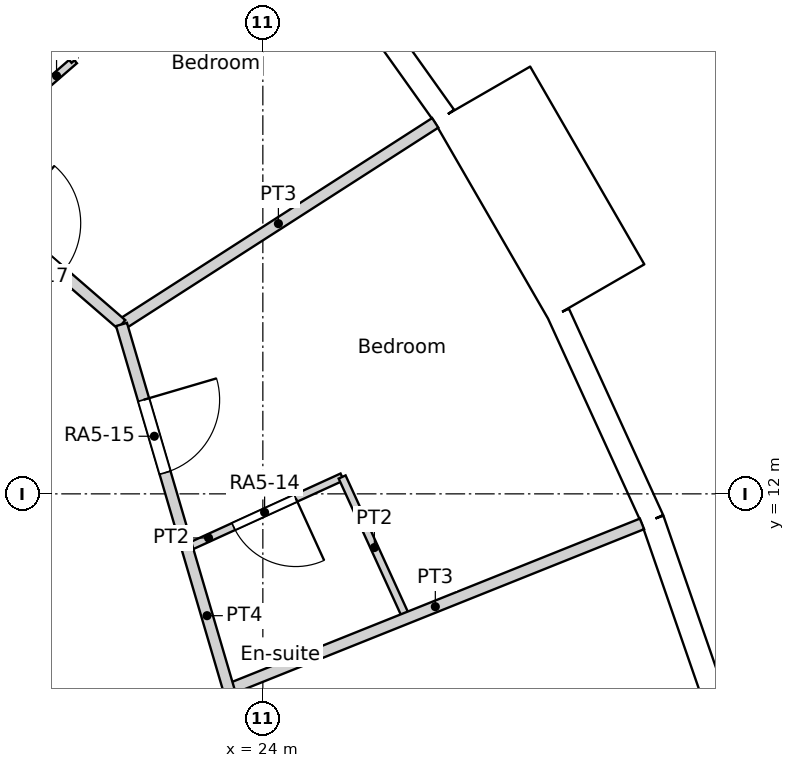
"""IFC4 building model, lengths in metres.
Left out: names, types, materials, properties, quantities, classifications, styles, units other than length and angle.
Written with IfcOpenShell. Run it as: python <this file> out.ifc"""

import sys

from ifc_helpers import new_model, si_unit, direction, frame, frame_2d, origin, origin_2d, place, context, subcontext, project, spatial, rectangle, circle, extrude, element, fill, save


model = new_model("IFC4")
c1 = context("Model", 3, precision=1e-05, world=origin(), true_north=direction((0.0, 1.0)))
c2 = subcontext(c1, "Body", "Model", "MODEL_VIEW")
j1 = project(units=[si_unit("LENGTHUNIT", "METRE"), si_unit("PLANEANGLEUNIT", "RADIAN")], contexts=[c1])
p1 = place(None, origin())
s1 = spatial("IfcSite", under=j1, at=p1, CompositionType="ELEMENT")
p2 = place(p1, origin())
s2 = spatial("IfcBuilding", under=s1, at=p2, CompositionType="ELEMENT")
p3 = place(p2, frame((0.0, 0.0, 71.4)))
s3 = spatial("IfcBuildingStorey", under=s2, at=p3, CompositionType="ELEMENT", Elevation=71.4)
for number, where, z_axis, x_axis in (
    (1, (28.106, 11.252, 0.0), (0.0, 0.0, 1.0), (1.0, 0.0, 0.0)),
    (2, (25.469, 16.368, 0.0), (0.0, 0.0, 1.0), (1.0, 0.0, 0.0)),
):
    element("IfcColumn", number, at=place(p3, frame(where, z_axis=z_axis, x_axis=x_axis)), inside=s3, PredefinedType="COLUMN", context=c2, shape_type="SweptSolid", body=[
        extrude(circle(Radius=0.6, at=origin_2d()), origin(), (0.0, 0.0, 1.0), 3.6),
    ])
p4 = place(p3, frame((21.937, 11.017, 0.0), z_axis=(0.0, 0.0, 1.0), x_axis=(1.0, 0.0, 0.0)))
e3 = element("IfcColumn", 3, at=p4, inside=s3, PredefinedType="COLUMN", context=c2, shape_type="SweptSolid", body=[
    extrude(circle(Radius=0.65, at=origin_2d()), origin(), (0.0, 0.0, 1.0), 3.6),
])
p5 = place(p3, frame((30.102, 8.845, 0.0), z_axis=(0.0, 0.0, 1.0), x_axis=(-0.327096492592, 0.944990944154, 0.0)))
e4 = element("IfcWall", 4, at=p5, inside=s3, PredefinedType="SOLIDWALL", context=c2, shape_type="SweptSolid", body=[
    extrude(rectangle(XDim=2.979, YDim=0.3, at=frame_2d((1.49, 0.0))), origin(), (0.0, 0.0, 1.0), 3.15),
])
p6 = place(p5, frame((1.49, 0.0, 1.55)))
e5 = element("IfcOpeningElement", 5, at=p6, cuts=e4, PredefinedType="OPENING", context=c2, shape_type="SweptSolid", body=[
    extrude(circle(Radius=0.9, at=origin_2d()), frame((0.0, 0.16, 0.0), z_axis=(0.0, -1.0, 0.0), x_axis=(1.0, 0.0, 0.0)), (0.0, 0.0, 1.0), 0.32),
])
p7 = place(p3, frame((29.127, 11.661, 0.0), z_axis=(0.0, 0.0, 1.0), x_axis=(-0.415407317162, 0.909635509888, 0.0)))
e6 = element("IfcWall", 6, at=p7, inside=s3, PredefinedType="SOLIDWALL", context=c2, shape_type="SweptSolid", body=[
    extrude(rectangle(XDim=2.98, YDim=0.3, at=frame_2d((1.49, 0.0))), origin(), (0.0, 0.0, 1.0), 3.15),
])
p8 = place(p7, frame((1.49, 0.0, 1.55)))
e7 = element("IfcOpeningElement", 7, at=p8, cuts=e6, PredefinedType="OPENING", context=c2, shape_type="SweptSolid", body=[
    extrude(circle(Radius=0.9, at=origin_2d()), frame((0.0, 0.16, 0.0), z_axis=(0.0, -1.0, 0.0), x_axis=(1.0, 0.0, 0.0)), (0.0, 0.0, 1.0), 0.32),
])
p9 = place(p3, frame((28.388, 14.658, -0.45), z_axis=(0.0, 0.0, 1.0), x_axis=(-0.499990139034, 0.866031096941, 0.0)))
e8 = element("IfcWall", 8, at=p9, inside=s3, PredefinedType="ELEMENTEDWALL", context=c2, shape_type="SweptSolid", body=[
    extrude(rectangle(XDim=3.0, YDim=1.45, at=frame_2d((1.5, 0.0))), origin(), (0.0, 0.0, 1.0), 3.6),
])
p10 = place(p9, frame((1.5, 0.0, 2.0)))
e9 = element("IfcOpeningElement", 9, at=p10, cuts=e8, PredefinedType="OPENING", context=c2, shape_type="SweptSolid", body=[
    extrude(circle(Radius=0.9, at=origin_2d()), frame((0.0, 0.735, 0.0), z_axis=(0.0, -1.0, 0.0), x_axis=(1.0, 0.0, 0.0)), (0.0, 0.0, 1.0), 1.47),
])
p11 = place(p3, frame((26.39, 16.967, 0.0), z_axis=(0.0, 0.0, 1.0), x_axis=(-0.580113774115, 0.814535456, 0.0)))
e10 = element("IfcWall", 10, at=p11, inside=s3, PredefinedType="SOLIDWALL", context=c2, shape_type="SweptSolid", body=[
    extrude(rectangle(XDim=2.98, YDim=0.3, at=frame_2d((1.49, 0.0))), origin(), (0.0, 0.0, 1.0), 3.15),
])
p12 = place(p11, frame((1.49, 0.0, 1.55)))
e11 = element("IfcOpeningElement", 11, at=p12, cuts=e10, PredefinedType="OPENING", context=c2, shape_type="SweptSolid", body=[
    extrude(circle(Radius=0.9, at=origin_2d()), frame((0.0, 0.16, 0.0), z_axis=(0.0, -1.0, 0.0), x_axis=(1.0, 0.0, 0.0)), (0.0, 0.0, 1.0), 0.32),
])
p13 = place(p3, frame((22.14, 14.229, 0.0), z_axis=(0.0, 0.0, 1.0), x_axis=(0.281780364869, -0.959478934617, 0.0)))
e12 = element("IfcWall", 12, at=p13, inside=s3, PredefinedType="PARTITIONING", context=c2, shape_type="SweptSolid", body=[
    extrude(rectangle(XDim=14.83, YDim=0.15, at=frame_2d((7.415, 0.0))), origin(), (0.0, 0.0, 1.0), 3.15),
])
p14 = place(p13, frame((10.816, 0.0, 0.0)))
e13 = element("IfcOpeningElement", 13, at=p14, cuts=e12, PredefinedType="OPENING", context=c2, shape_type="SweptSolid", body=[
    extrude(rectangle(XDim=1.0, YDim=2.1, at=frame_2d((0.5, 1.05))), frame((0.0, 0.075, 0.0), z_axis=(0.0, -1.0, 0.0), x_axis=(1.0, 0.0, 0.0)), (0.0, 0.0, 1.0), 0.15),
])
p15 = place(p13, frame((5.953, 0.0, 0.0)))
e14 = element("IfcOpeningElement", 14, at=p15, cuts=e12, PredefinedType="OPENING", context=c2, shape_type="SweptSolid", body=[
    extrude(rectangle(XDim=1.0, YDim=2.1, at=frame_2d((0.5, 1.05))), frame((0.0, 0.075, 0.0), z_axis=(0.0, -1.0, 0.0), x_axis=(1.0, 0.0, 0.0)), (0.0, 0.0, 1.0), 0.15),
])
p16 = place(p13, frame((1.033, 0.0, 0.0)))
e15 = element("IfcOpeningElement", 15, at=p16, cuts=e12, PredefinedType="OPENING", context=c2, shape_type="SweptSolid", body=[
    extrude(rectangle(XDim=1.0, YDim=2.1, at=frame_2d((0.5, 1.05))), frame((0.0, 0.075, 0.0), z_axis=(0.0, -1.0, 0.0), x_axis=(1.0, 0.0, 0.0)), (0.0, 0.0, 1.0), 0.15),
])
p17 = place(p3, frame((10.932, 23.939, 0.0), z_axis=(0.0, 0.0, 1.0), x_axis=(0.755838982892, -0.654757536757, 0.0)))
e16 = element("IfcWall", 16, at=p17, inside=s3, PredefinedType="PARTITIONING", context=c2, shape_type="SweptSolid", body=[
    extrude(rectangle(XDim=14.83, YDim=0.15, at=frame_2d((7.415, 0.0))), origin(), (0.0, 0.0, 1.0), 3.15),
])
p18 = place(p17, frame((12.796, 0.0, 0.0)))
e17 = element("IfcOpeningElement", 17, at=p18, cuts=e16, PredefinedType="OPENING", context=c2, shape_type="SweptSolid", body=[
    extrude(rectangle(XDim=1.0, YDim=2.1, at=frame_2d((0.5, 1.05))), frame((0.0, 0.075, 0.0), z_axis=(0.0, -1.0, 0.0), x_axis=(1.0, 0.0, 0.0)), (0.0, 0.0, 1.0), 0.15),
])
p19 = place(p17, frame((7.572, 0.0, 0.0)))
e18 = element("IfcOpeningElement", 18, at=p19, cuts=e16, PredefinedType="OPENING", context=c2, shape_type="SweptSolid", body=[
    extrude(rectangle(XDim=1.0, YDim=2.1, at=frame_2d((0.5, 1.05))), frame((0.0, 0.075, 0.0), z_axis=(0.0, -1.0, 0.0), x_axis=(1.0, 0.0, 0.0)), (0.0, 0.0, 1.0), 0.15),
])
p20 = place(p17, frame((1.033, 0.0, 0.0)))
e19 = element("IfcOpeningElement", 19, at=p20, cuts=e16, PredefinedType="OPENING", context=c2, shape_type="SweptSolid", body=[
    extrude(rectangle(XDim=1.0, YDim=2.1, at=frame_2d((0.5, 1.05))), frame((0.0, 0.075, 0.0), z_axis=(0.0, -1.0, 0.0), x_axis=(1.0, 0.0, 0.0)), (0.0, 0.0, 1.0), 0.15),
])
p21 = place(p3, frame((23.55, 9.427, 0.0), z_axis=(0.0, 0.0, 1.0), x_axis=(0.928307005382, 0.371814609393, 0.0)))
e20 = element("IfcWall", 20, at=p21, inside=s3, PredefinedType="PARTITIONING", context=c2, shape_type="SweptSolid", body=[
    extrude(rectangle(XDim=5.858, YDim=0.15, at=frame_2d((2.929, 0.0))), origin(), (0.0, 0.0, 1.0), 3.15),
])
p22 = place(p3, frame((25.043, 12.222, 0.0), z_axis=(0.0, 0.0, 1.0), x_axis=(0.41546015385, -0.909611378866, 0.0)))
e21 = element("IfcWall", 21, at=p22, inside=s3, PredefinedType="PARTITIONING", context=c2, shape_type="SweptSolid", body=[
    extrude(rectangle(XDim=2.042, YDim=0.1, at=frame_2d((1.021, 0.0))), origin(), (0.0, 0.0, 1.0), 3.15),
])
p23 = place(p3, frame((23.003, 11.291, 0.0), z_axis=(0.0, 0.0, 1.0), x_axis=(0.90975773562, 0.41513956988, 0.0)))
e22 = element("IfcWall", 22, at=p23, inside=s3, PredefinedType="PARTITIONING", context=c2, shape_type="SweptSolid", body=[
    extrude(rectangle(XDim=2.242, YDim=0.1, at=frame_2d((1.121, 0.0))), origin(), (0.0, 0.0, 1.0), 3.15),
])
p24 = place(p23, frame((0.671, 0.0, 0.0)))
e23 = element("IfcOpeningElement", 23, at=p24, cuts=e22, PredefinedType="OPENING", context=c2, shape_type="SweptSolid", body=[
    extrude(rectangle(XDim=0.9, YDim=2.04, at=frame_2d((0.45, 1.02))), frame((0.0, 0.05, 0.0), z_axis=(0.0, -1.0, 0.0), x_axis=(1.0, 0.0, 0.0)), (0.0, 0.0, 1.0), 0.1),
])
p25 = place(p3, frame((22.141, 14.229, 0.0), z_axis=(0.0, 0.0, 1.0), x_axis=(0.841265781699, 0.540621757371, 0.0)))
e24 = element("IfcWall", 24, at=p25, inside=s3, PredefinedType="PARTITIONING", context=c2, shape_type="SweptSolid", body=[
    extrude(rectangle(XDim=4.906, YDim=0.15, at=frame_2d((2.453, 0.0))), origin(), (0.0, 0.0, 1.0), 3.15),
])
p26 = place(p3, frame((19.826, 16.234, 0.0), z_axis=(0.0, 0.0, 1.0), x_axis=(0.755703447798, 0.654913963042, 0.0)))
e25 = element("IfcWall", 25, at=p26, inside=s3, PredefinedType="PARTITIONING", context=c2, shape_type="SweptSolid", body=[
    extrude(rectangle(XDim=2.243, YDim=0.1, at=frame_2d((1.122, 0.0))), origin(), (0.0, 0.0, 1.0), 3.15),
])
p27 = place(p26, frame((0.671, 0.0, 0.0)))
e26 = element("IfcOpeningElement", 26, at=p27, cuts=e25, PredefinedType="OPENING", context=c2, shape_type="SweptSolid", body=[
    extrude(rectangle(XDim=0.9, YDim=2.04, at=frame_2d((0.45, 1.02))), frame((0.0, 0.05, 0.0), z_axis=(0.0, -1.0, 0.0), x_axis=(1.0, 0.0, 0.0)), (0.0, 0.0, 1.0), 0.1),
])
p28 = place(p3, frame((20.184, 19.245, 0.0), z_axis=(0.0, 0.0, 1.0), x_axis=(0.655017058368, -0.755614090159, 0.0)))
e27 = element("IfcWall", 27, at=p28, inside=s3, PredefinedType="PARTITIONING", context=c2, shape_type="SweptSolid", body=[
    extrude(rectangle(XDim=2.041, YDim=0.1, at=frame_2d((1.021, 0.0))), origin(), (0.0, 0.0, 1.0), 3.15),
])
p29 = place(p3, frame((18.36, 17.505, 0.0), z_axis=(0.0, 0.0, 1.0), x_axis=(0.723686703731, 0.690128650937, 0.0)))
e28 = element("IfcWall", 28, at=p29, inside=s3, PredefinedType="PARTITIONING", context=c2, shape_type="SweptSolid", body=[
    extrude(rectangle(XDim=5.856, YDim=0.15, at=frame_2d((2.928, 0.0))), origin(), (0.0, 0.0, 1.0), 3.15),
])
p30 = place(p6, origin())
e29 = element("IfcWindow", 29, at=p30, inside=s3, PartitioningType="SINGLE_PANEL", PredefinedType="WINDOW", context=c2, shape_type="SweptSolid", body=[
    extrude(circle(Radius=0.9, at=origin_2d()), frame((0.0, 0.12, 0.0), z_axis=(0.0, -1.0, 0.0), x_axis=(1.0, 0.0, 0.0)), (0.0, 0.0, 1.0), 0.1),
])
fill(e5, e29)
p31 = place(p8, origin())
e30 = element("IfcWindow", 30, at=p31, inside=s3, PartitioningType="SINGLE_PANEL", PredefinedType="WINDOW", context=c2, shape_type="SweptSolid", body=[
    extrude(circle(Radius=0.9, at=origin_2d()), frame((0.0, 0.12, 0.0), z_axis=(0.0, -1.0, 0.0), x_axis=(1.0, 0.0, 0.0)), (0.0, 0.0, 1.0), 0.1),
])
fill(e7, e30)
p32 = place(p10, origin())
e31 = element("IfcWindow", 31, at=p32, inside=s3, PartitioningType="SINGLE_PANEL", PredefinedType="WINDOW", context=c2, shape_type="SweptSolid", body=[
    extrude(circle(Radius=0.9, at=origin_2d()), frame((0.0, 0.695, 0.0), z_axis=(0.0, -1.0, 0.0), x_axis=(1.0, 0.0, 0.0)), (0.0, 0.0, 1.0), 0.1),
])
fill(e9, e31)
p33 = place(p12, origin())
e32 = element("IfcWindow", 32, at=p33, inside=s3, PartitioningType="SINGLE_PANEL", PredefinedType="WINDOW", context=c2, shape_type="SweptSolid", body=[
    extrude(circle(Radius=0.9, at=origin_2d()), frame((0.0, 0.12, 0.0), z_axis=(0.0, -1.0, 0.0), x_axis=(1.0, 0.0, 0.0)), (0.0, 0.0, 1.0), 0.1),
])
fill(e11, e32)
p34 = place(p24, origin())
e33 = element("IfcDoor", 33, at=p34, inside=s3, OperationType="SINGLE_SWING_LEFT", PredefinedType="DOOR", context=c2, shape_type="SweptSolid", body=[
    extrude(rectangle(XDim=0.9, YDim=2.04, at=frame_2d((0.45, 1.02))), frame((0.0, 0.025, 0.0), z_axis=(0.0, -1.0, 0.0), x_axis=(1.0, 0.0, 0.0)), (0.0, 0.0, 1.0), 0.05),
])
fill(e23, e33)
p35 = place(p16, origin())
e34 = element("IfcDoor", 34, at=p35, inside=s3, OperationType="SINGLE_SWING_LEFT", PredefinedType="DOOR", context=c2, shape_type="SweptSolid", body=[
    extrude(rectangle(XDim=1.0, YDim=2.1, at=frame_2d((0.5, 1.05))), frame((0.0, 0.025, 0.0), z_axis=(0.0, -1.0, 0.0), x_axis=(1.0, 0.0, 0.0)), (0.0, 0.0, 1.0), 0.05),
])
fill(e15, e34)
p36 = place(p18, origin())
e35 = element("IfcDoor", 35, at=p36, inside=s3, OperationType="SINGLE_SWING_LEFT", PredefinedType="DOOR", context=c2, shape_type="SweptSolid", body=[
    extrude(rectangle(XDim=1.0, YDim=2.1, at=frame_2d((0.5, 1.05))), frame((0.0, 0.025, 0.0), z_axis=(0.0, -1.0, 0.0), x_axis=(1.0, 0.0, 0.0)), (0.0, 0.0, 1.0), 0.05),
])
fill(e17, e35)
save(model, sys.argv[1])
